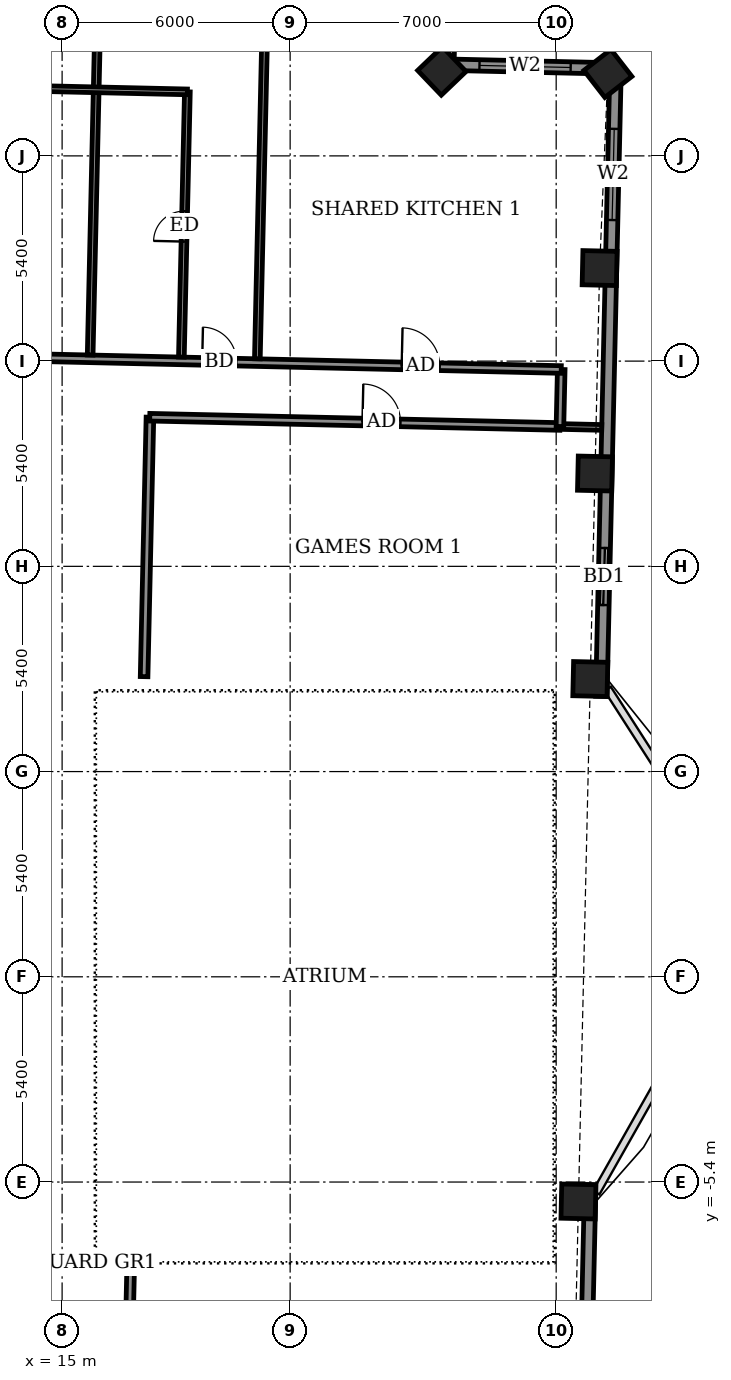
"""IFC4 building model, lengths in metres.
Left out: names, types, materials, properties, quantities, classifications, styles, units other than length and angle.
Written with IfcOpenShell. Run it as: python <this file> out.ifc"""

import sys

from ifc_helpers import new_model, si_unit, direction, frame, frame_2d, origin, origin_2d, place, context, subcontext, project, spatial, rectangle, extrude, element, fill, save


model = new_model("IFC4")
c1 = context("Model", 3, precision=1e-05, world=origin(), true_north=direction((0.0, 1.0)))
c2 = subcontext(c1, "Body", "Model", "MODEL_VIEW")
j1 = project(units=[si_unit("LENGTHUNIT", "METRE"), si_unit("PLANEANGLEUNIT", "RADIAN")], contexts=[c1])
p1 = place(None, origin())
s1 = spatial("IfcSite", under=j1, at=p1, CompositionType="ELEMENT")
p2 = place(p1, origin())
s2 = spatial("IfcBuilding", under=s1, at=p2, CompositionType="ELEMENT")
p3 = place(p2, frame((0.0, 0.0, 309.7)))
s3 = spatial("IfcBuildingStorey", under=s2, at=p3, CompositionType="ELEMENT", Elevation=309.7)
for number, where, z_axis, x_axis in (
    (1, (28.586, -5.912, -0.55), (0.0, 0.0, 1.0), (0.023, 1.0, 0.0)),
    (2, (28.898, 7.835, -0.55), (0.0, 0.0, 1.0), (0.023, 1.0, 0.0)),
    (3, (29.021, 13.242, -0.55), (0.0, 0.0, 1.0), (0.023, 1.0, 0.0)),
    (4, (29.143, 18.648, -0.55), (0.0, 0.0, 1.0), (0.023, 1.0, 0.0)),
    (5, (29.361, 23.769, -0.55), (0.0, 0.0, 1.0), (-0.613, 0.79, 0.0)),
    (6, (24.992, 23.834, -0.55), (0.0, 0.0, 1.0), (-0.691, 0.723, 0.0)),
):
    element("IfcColumn", number, at=place(p3, frame(where, z_axis=z_axis, x_axis=x_axis)), inside=s3, PredefinedType="COLUMN", context=c2, shape_type="SweptSolid", body=[
        extrude(rectangle(XDim=0.9, YDim=0.9, at=origin_2d()), origin(), (0.0, 0.0, 1.0), 3.6),
    ])
p4 = place(p3, frame((28.544, -20.99, 0.0), z_axis=(0.0, 0.0, 1.0), x_axis=(0.022676396018, 0.999742857471, 0.0)))
e7 = element("IfcWall", 7, at=p4, inside=s3, PredefinedType="SOLIDWALL", context=c2, shape_type="SweptSolid", body=[
    extrude(rectangle(XDim=15.525, YDim=0.3, at=frame_2d((7.762, 0.0))), origin(), (0.0, 0.0, 1.0), 2.55),
])
p5 = place(p4, frame((1.895, 0.0, 0.0)))
e8 = element("IfcOpeningElement", 8, at=p5, cuts=e7, PredefinedType="OPENING", context=c2, shape_type="SweptSolid", body=[
    extrude(rectangle(XDim=1.5, YDim=2.4, at=frame_2d((0.75, 1.2))), frame((0.0, 0.16, 0.0), z_axis=(0.0, -1.0, 0.0), x_axis=(1.0, 0.0, 0.0)), (0.0, 0.0, 1.0), 0.32),
])
p6 = place(p4, frame((10.946, 0.0, 0.9)))
e9 = element("IfcOpeningElement", 9, at=p6, cuts=e7, PredefinedType="OPENING", context=c2, shape_type="SweptSolid", body=[
    extrude(rectangle(XDim=1.2, YDim=1.5, at=frame_2d((0.6, 0.75))), frame((0.0, 0.16, 0.0), z_axis=(0.0, -1.0, 0.0), x_axis=(1.0, 0.0, 0.0)), (0.0, 0.0, 1.0), 0.32),
])
p7 = place(p3, frame((29.188, 7.379, 0.0), z_axis=(0.0, 0.0, 1.0), x_axis=(0.022693884957, 0.99974246063, 0.0)))
e10 = element("IfcWall", 10, at=p7, inside=s3, PredefinedType="SOLIDWALL", context=c2, shape_type="SweptSolid", body=[
    extrude(rectangle(XDim=16.524, YDim=0.3, at=frame_2d((8.262, 0.0))), origin(), (0.0, 0.0, 1.0), 2.55),
])
p8 = place(p7, frame((2.404, 0.0, 0.0)))
e11 = element("IfcOpeningElement", 11, at=p8, cuts=e10, PredefinedType="OPENING", context=c2, shape_type="SweptSolid", body=[
    extrude(rectangle(XDim=1.5, YDim=2.4, at=frame_2d((0.75, 1.2))), frame((0.0, 0.16, 0.0), z_axis=(0.0, -1.0, 0.0), x_axis=(1.0, 0.0, 0.0)), (0.0, 0.0, 1.0), 0.32),
])
p9 = place(p7, frame((12.536, 0.0, 0.9)))
e12 = element("IfcOpeningElement", 12, at=p9, cuts=e10, PredefinedType="OPENING", context=c2, shape_type="SweptSolid", body=[
    extrude(rectangle(XDim=2.4, YDim=1.5, at=frame_2d((1.2, 0.75))), frame((0.0, 0.16, 0.0), z_axis=(0.0, -1.0, 0.0), x_axis=(1.0, 0.0, 0.0)), (0.0, 0.0, 1.0), 0.32),
])
p10 = place(p3, frame((29.563, 23.899, 0.0), z_axis=(0.0, 0.0, 1.0), x_axis=(-0.999741204967, 0.022749133868, 0.0)))
e13 = element("IfcWall", 13, at=p10, inside=s3, PredefinedType="SOLIDWALL", context=c2, shape_type="SweptSolid", body=[
    extrude(rectangle(XDim=4.4, YDim=0.3, at=frame_2d((2.2, 0.0))), origin(), (0.0, 0.0, 1.0), 2.55),
])
p11 = place(p10, frame((1.182, 0.0, 0.9)))
e14 = element("IfcOpeningElement", 14, at=p11, cuts=e13, PredefinedType="OPENING", context=c2, shape_type="SweptSolid", body=[
    extrude(rectangle(XDim=2.4, YDim=1.5, at=frame_2d((1.2, 0.75))), frame((0.0, 0.16, 0.0), z_axis=(0.0, -1.0, 0.0), x_axis=(1.0, 0.0, 0.0)), (0.0, 0.0, 1.0), 0.32),
])
p12 = place(p3, frame((25.164, 23.999, 0.0), z_axis=(0.0, 0.0, 1.0), x_axis=(0.02269871331, 0.999742351016, 0.0)))
e15 = element("IfcWall", 15, at=p12, inside=s3, PredefinedType="SOLIDWALL", context=c2, shape_type="SweptSolid", body=[
    extrude(rectangle(XDim=4.399, YDim=0.3, at=frame_2d((2.2, 0.0))), origin(), (0.0, 0.0, 1.0), 2.55),
])
p13 = place(p12, frame((0.807, 0.0, 0.9)))
e16 = element("IfcOpeningElement", 16, at=p13, cuts=e15, PredefinedType="OPENING", context=c2, shape_type="SweptSolid", body=[
    extrude(rectangle(XDim=2.4, YDim=1.5, at=frame_2d((1.2, 0.75))), frame((0.0, 0.16, 0.0), z_axis=(0.0, -1.0, 0.0), x_axis=(1.0, 0.0, 0.0)), (0.0, 0.0, 1.0), 0.32),
])
p14 = place(p3, frame((16.684, -12.919, 0.0), z_axis=(0.0, 0.0, 1.0), x_axis=(0.022667483124, 0.999743059595, 0.0)))
e17 = element("IfcWall", 17, at=p14, inside=s3, PredefinedType="PARTITIONING", context=c2, shape_type="SweptSolid", body=[
    extrude(rectangle(XDim=5.245, YDim=0.2, at=frame_2d((2.623, 0.0))), origin(), (0.0, 0.0, 1.0), 3.05),
])
p15 = place(p3, frame((17.157, 7.898, 0.0), z_axis=(0.0, 0.0, 1.0), x_axis=(0.022562209343, 0.999745440955, 0.0)))
e18 = element("IfcWall", 18, at=p15, inside=s3, PredefinedType="PARTITIONING", context=c2, shape_type="SweptSolid", body=[
    extrude(rectangle(XDim=6.828, YDim=0.2, at=frame_2d((3.414, 0.0))), origin(), (0.0, 0.0, 1.0), 3.05),
])
p16 = place(p3, frame((17.306, 14.724, 0.0), z_axis=(0.0, 0.0, 1.0), x_axis=(0.999744269809, -0.022614043969, 0.0)))
e19 = element("IfcWall", 19, at=p16, inside=s3, PredefinedType="PARTITIONING", context=c2, shape_type="SweptSolid", body=[
    extrude(rectangle(XDim=10.796, YDim=0.2, at=frame_2d((5.398, 0.0))), origin(), (0.0, 0.0, 1.0), 3.05),
])
p17 = place(p16, frame((5.598, 0.0, 0.0)))
e20 = element("IfcOpeningElement", 20, at=p17, cuts=e19, PredefinedType="OPENING", context=c2, shape_type="SweptSolid", body=[
    extrude(rectangle(XDim=1.0, YDim=2.1, at=frame_2d((0.5, 1.05))), frame((0.0, 0.11, 0.0), z_axis=(0.0, -1.0, 0.0), x_axis=(1.0, 0.0, 0.0)), (0.0, 0.0, 1.0), 0.22),
])
p18 = place(p3, frame((28.099, 14.48, 0.0), z_axis=(0.0, 0.0, 1.0), x_axis=(0.999743779532, -0.022635708216, 0.0)))
e21 = element("IfcWall", 21, at=p18, inside=s3, PredefinedType="PARTITIONING", context=c2, shape_type="SweptSolid", body=[
    extrude(rectangle(XDim=1.1, YDim=0.15, at=frame_2d((0.55, 0.0))), origin(), (0.0, 0.0, 1.0), 2.55),
])
p19 = place(p3, frame((28.099, 14.48, 0.0), z_axis=(0.0, 0.0, 1.0), x_axis=(0.022632637625, 0.99974384905, 0.0)))
e22 = element("IfcWall", 22, at=p19, inside=s3, PredefinedType="PARTITIONING", context=c2, shape_type="SweptSolid", body=[
    extrude(rectangle(XDim=1.5, YDim=0.2, at=frame_2d((0.75, 0.0))), origin(), (0.0, 0.0, 1.0), 3.05),
])
p20 = place(p3, frame((-30.652, 17.313, 0.0), z_axis=(0.0, 0.0, 1.0), x_axis=(0.999742623764, -0.02268669719, 0.0)))
e23 = element("IfcWall", 23, at=p20, inside=s3, PredefinedType="PARTITIONING", context=c2, shape_type="SweptSolid", body=[
    extrude(rectangle(XDim=58.8, YDim=0.2, at=frame_2d((29.4, 0.0))), origin(), (0.0, 0.0, 1.0), 3.05),
])
p21 = place(p20, frame((54.601, 0.0, 0.0)))
e24 = element("IfcOpeningElement", 24, at=p21, cuts=e23, PredefinedType="OPENING", context=c2, shape_type="SweptSolid", body=[
    extrude(rectangle(XDim=1.0, YDim=2.1, at=frame_2d((0.5, 1.05))), frame((0.0, 0.11, 0.0), z_axis=(0.0, -1.0, 0.0), x_axis=(1.0, 0.0, 0.0)), (0.0, 0.0, 1.0), 0.22),
])
p22 = place(p20, frame((49.35, 0.0, 0.0)))
e25 = element("IfcOpeningElement", 25, at=p22, cuts=e23, PredefinedType="OPENING", context=c2, shape_type="SweptSolid", body=[
    extrude(rectangle(XDim=0.9, YDim=2.1, at=frame_2d((0.45, 1.05))), frame((0.0, 0.11, 0.0), z_axis=(0.0, -1.0, 0.0), x_axis=(1.0, 0.0, 0.0)), (0.0, 0.0, 1.0), 0.22),
])
p23 = place(p20, frame((42.55, 0.0, 0.0)))
e26 = element("IfcOpeningElement", 26, at=p23, cuts=e23, PredefinedType="OPENING", context=c2, shape_type="SweptSolid", body=[
    extrude(rectangle(XDim=0.9, YDim=2.1, at=frame_2d((0.45, 1.05))), frame((0.0, 0.11, 0.0), z_axis=(0.0, -1.0, 0.0), x_axis=(1.0, 0.0, 0.0)), (0.0, 0.0, 1.0), 0.22),
])
p24 = place(p20, frame((40.475, 0.0, 0.0)))
e27 = element("IfcOpeningElement", 27, at=p24, cuts=e23, PredefinedType="OPENING", context=c2, shape_type="SweptSolid", body=[
    extrude(rectangle(XDim=0.9, YDim=2.1, at=frame_2d((0.45, 1.05))), frame((0.0, 0.11, 0.0), z_axis=(0.0, -1.0, 0.0), x_axis=(1.0, 0.0, 0.0)), (0.0, 0.0, 1.0), 0.22),
])
p25 = place(p20, frame((33.6, 0.0, 0.0)))
e28 = element("IfcOpeningElement", 28, at=p25, cuts=e23, PredefinedType="OPENING", context=c2, shape_type="SweptSolid", body=[
    extrude(rectangle(XDim=0.9, YDim=2.1, at=frame_2d((0.45, 1.05))), frame((0.0, 0.11, 0.0), z_axis=(0.0, -1.0, 0.0), x_axis=(1.0, 0.0, 0.0)), (0.0, 0.0, 1.0), 0.22),
])
p26 = place(p20, frame((31.55, 0.0, 0.0)))
e29 = element("IfcOpeningElement", 29, at=p26, cuts=e23, PredefinedType="OPENING", context=c2, shape_type="SweptSolid", body=[
    extrude(rectangle(XDim=0.9, YDim=2.1, at=frame_2d((0.45, 1.05))), frame((0.0, 0.11, 0.0), z_axis=(0.0, -1.0, 0.0), x_axis=(1.0, 0.0, 0.0)), (0.0, 0.0, 1.0), 0.22),
])
p27 = place(p20, frame((24.425, 0.0, 0.0)))
e30 = element("IfcOpeningElement", 30, at=p27, cuts=e23, PredefinedType="OPENING", context=c2, shape_type="SweptSolid", body=[
    extrude(rectangle(XDim=0.9, YDim=2.1, at=frame_2d((0.45, 1.05))), frame((0.0, 0.11, 0.0), z_axis=(0.0, -1.0, 0.0), x_axis=(1.0, 0.0, 0.0)), (0.0, 0.0, 1.0), 0.22),
])
p28 = place(p20, frame((22.05, 0.0, 0.0)))
e31 = element("IfcOpeningElement", 31, at=p28, cuts=e23, PredefinedType="OPENING", context=c2, shape_type="SweptSolid", body=[
    extrude(rectangle(XDim=0.9, YDim=2.1, at=frame_2d((0.45, 1.05))), frame((0.0, 0.11, 0.0), z_axis=(0.0, -1.0, 0.0), x_axis=(1.0, 0.0, 0.0)), (0.0, 0.0, 1.0), 0.22),
])
p29 = place(p20, frame((14.95, 0.0, 0.0)))
e32 = element("IfcOpeningElement", 32, at=p29, cuts=e23, PredefinedType="OPENING", context=c2, shape_type="SweptSolid", body=[
    extrude(rectangle(XDim=0.9, YDim=2.1, at=frame_2d((0.45, 1.05))), frame((0.0, 0.11, 0.0), z_axis=(0.0, -1.0, 0.0), x_axis=(1.0, 0.0, 0.0)), (0.0, 0.0, 1.0), 0.22),
])
p30 = place(p20, frame((12.525, 0.0, 0.0)))
e33 = element("IfcOpeningElement", 33, at=p30, cuts=e23, PredefinedType="OPENING", context=c2, shape_type="SweptSolid", body=[
    extrude(rectangle(XDim=0.9, YDim=2.1, at=frame_2d((0.45, 1.05))), frame((0.0, 0.11, 0.0), z_axis=(0.0, -1.0, 0.0), x_axis=(1.0, 0.0, 0.0)), (0.0, 0.0, 1.0), 0.22),
])
p31 = place(p20, frame((4.032, 0.0, 0.0)))
e34 = element("IfcOpeningElement", 34, at=p31, cuts=e23, PredefinedType="OPENING", context=c2, shape_type="SweptSolid", body=[
    extrude(rectangle(XDim=1.0, YDim=2.1, at=frame_2d((0.5, 1.05))), frame((0.0, 0.11, 0.0), z_axis=(0.0, -1.0, 0.0), x_axis=(1.0, 0.0, 0.0)), (0.0, 0.0, 1.0), 0.22),
])
p32 = place(p3, frame((15.738, 16.36, 0.0), z_axis=(0.0, 0.0, 1.0), x_axis=(0.022740189192, 0.999741408463, 0.0)))
e35 = element("IfcWall", 35, at=p32, inside=s3, PredefinedType="PARTITIONING", context=c2, shape_type="SweptSolid", body=[
    extrude(rectangle(XDim=12.4, YDim=0.15, at=frame_2d((6.2, 0.0))), origin(), (0.0, 0.0, 1.0), 2.5),
])
p33 = place(p3, frame((18.138, 16.306, 0.0), z_axis=(0.0, 0.0, 1.0), x_axis=(0.022630826984, 0.999743890039, 0.0)))
e36 = element("IfcWall", 36, at=p33, inside=s3, PredefinedType="PARTITIONING", context=c2, shape_type="SweptSolid", body=[
    extrude(rectangle(XDim=6.98, YDim=0.15, at=frame_2d((3.49, 0.0))), origin(), (0.0, 0.0, 1.0), 3.05),
])
p34 = place(p33, frame((3.04, 0.0, 0.0)))
e37 = element("IfcOpeningElement", 37, at=p34, cuts=e36, PredefinedType="OPENING", context=c2, shape_type="SweptSolid", body=[
    extrude(rectangle(XDim=0.8, YDim=2.1, at=frame_2d((0.4, 1.05))), frame((0.0, 0.085, 0.0), z_axis=(0.0, -1.0, 0.0), x_axis=(1.0, 0.0, 0.0)), (0.0, 0.0, 1.0), 0.17),
])
p35 = place(p3, frame((20.137, 16.261, 0.0), z_axis=(0.0, 0.0, 1.0), x_axis=(0.022663260168, 0.999743155335, 0.0)))
e38 = element("IfcWall", 38, at=p35, inside=s3, PredefinedType="PARTITIONING", context=c2, shape_type="SweptSolid", body=[
    extrude(rectangle(XDim=12.399, YDim=0.15, at=frame_2d((6.2, 0.0))), origin(), (0.0, 0.0, 1.0), 2.5),
])
p36 = place(p3, frame((13.497, 23.393, 0.0), z_axis=(0.0, 0.0, 1.0), x_axis=(0.999741520352, -0.022735269617, 0.0)))
e39 = element("IfcWall", 39, at=p36, inside=s3, PredefinedType="PARTITIONING", context=c2, shape_type="SweptSolid", body=[
    extrude(rectangle(XDim=4.8, YDim=0.15, at=frame_2d((2.4, 0.0))), origin(), (0.0, 0.0, 1.0), 3.05),
])
p37 = place(p8, origin())
e40 = element("IfcDoor", 40, at=p37, inside=s3, OperationType="SLIDING_TO_LEFT", PredefinedType="DOOR", context=c2, shape_type="SweptSolid", body=[
    extrude(rectangle(XDim=1.5, YDim=2.4, at=frame_2d((0.75, 1.2))), frame((0.0, 0.025, 0.0), z_axis=(0.0, -1.0, 0.0), x_axis=(1.0, 0.0, 0.0)), (0.0, 0.0, 1.0), 0.05),
])
fill(e11, e40)
p38 = place(p9, origin())
e41 = element("IfcWindow", 41, at=p38, inside=s3, PartitioningType="DOUBLE_PANEL_VERTICAL", PredefinedType="WINDOW", context=c2, shape_type="SweptSolid", body=[
    extrude(rectangle(XDim=2.4, YDim=1.5, at=frame_2d((1.2, 0.75))), frame((0.0, 0.03, 0.0), z_axis=(0.0, -1.0, 0.0), x_axis=(1.0, 0.0, 0.0)), (0.0, 0.0, 1.0), 0.06),
])
fill(e12, e41)
p39 = place(p11, origin())
e42 = element("IfcWindow", 42, at=p39, inside=s3, PartitioningType="DOUBLE_PANEL_VERTICAL", PredefinedType="WINDOW", context=c2, shape_type="SweptSolid", body=[
    extrude(rectangle(XDim=2.4, YDim=1.5, at=frame_2d((1.2, 0.75))), frame((0.0, 0.03, 0.0), z_axis=(0.0, -1.0, 0.0), x_axis=(1.0, 0.0, 0.0)), (0.0, 0.0, 1.0), 0.06),
])
fill(e14, e42)
p40 = place(p17, origin())
e43 = element("IfcDoor", 43, at=p40, inside=s3, OperationType="SINGLE_SWING_RIGHT", PredefinedType="DOOR", context=c2, shape_type="SweptSolid", body=[
    extrude(rectangle(XDim=1.0, YDim=2.1, at=frame_2d((0.5, 1.05))), frame((0.0, 0.025, 0.0), z_axis=(0.0, -1.0, 0.0), x_axis=(1.0, 0.0, 0.0)), (0.0, 0.0, 1.0), 0.05),
])
fill(e20, e43)
p41 = place(p21, origin())
e44 = element("IfcDoor", 44, at=p41, inside=s3, OperationType="SINGLE_SWING_LEFT", PredefinedType="DOOR", context=c2, shape_type="SweptSolid", body=[
    extrude(rectangle(XDim=1.0, YDim=2.1, at=frame_2d((0.5, 1.05))), frame((0.0, 0.025, 0.0), z_axis=(0.0, -1.0, 0.0), x_axis=(1.0, 0.0, 0.0)), (0.0, 0.0, 1.0), 0.05),
])
fill(e24, e44)
p42 = place(p22, origin())
e45 = element("IfcDoor", 45, at=p42, inside=s3, OperationType="SINGLE_SWING_LEFT", PredefinedType="DOOR", context=c2, shape_type="SweptSolid", body=[
    extrude(rectangle(XDim=0.9, YDim=2.1, at=frame_2d((0.45, 1.05))), frame((0.0, 0.025, 0.0), z_axis=(0.0, -1.0, 0.0), x_axis=(1.0, 0.0, 0.0)), (0.0, 0.0, 1.0), 0.05),
])
fill(e25, e45)
p43 = place(p34, origin())
e46 = element("IfcDoor", 46, at=p43, inside=s3, OperationType="SINGLE_SWING_LEFT", PredefinedType="DOOR", context=c2, shape_type="SweptSolid", body=[
    extrude(rectangle(XDim=0.8, YDim=2.1, at=frame_2d((0.4, 1.05))), frame((0.0, 0.025, 0.0), z_axis=(0.0, -1.0, 0.0), x_axis=(1.0, 0.0, 0.0)), (0.0, 0.0, 1.0), 0.05),
])
fill(e37, e46)
save(model, sys.argv[1])
